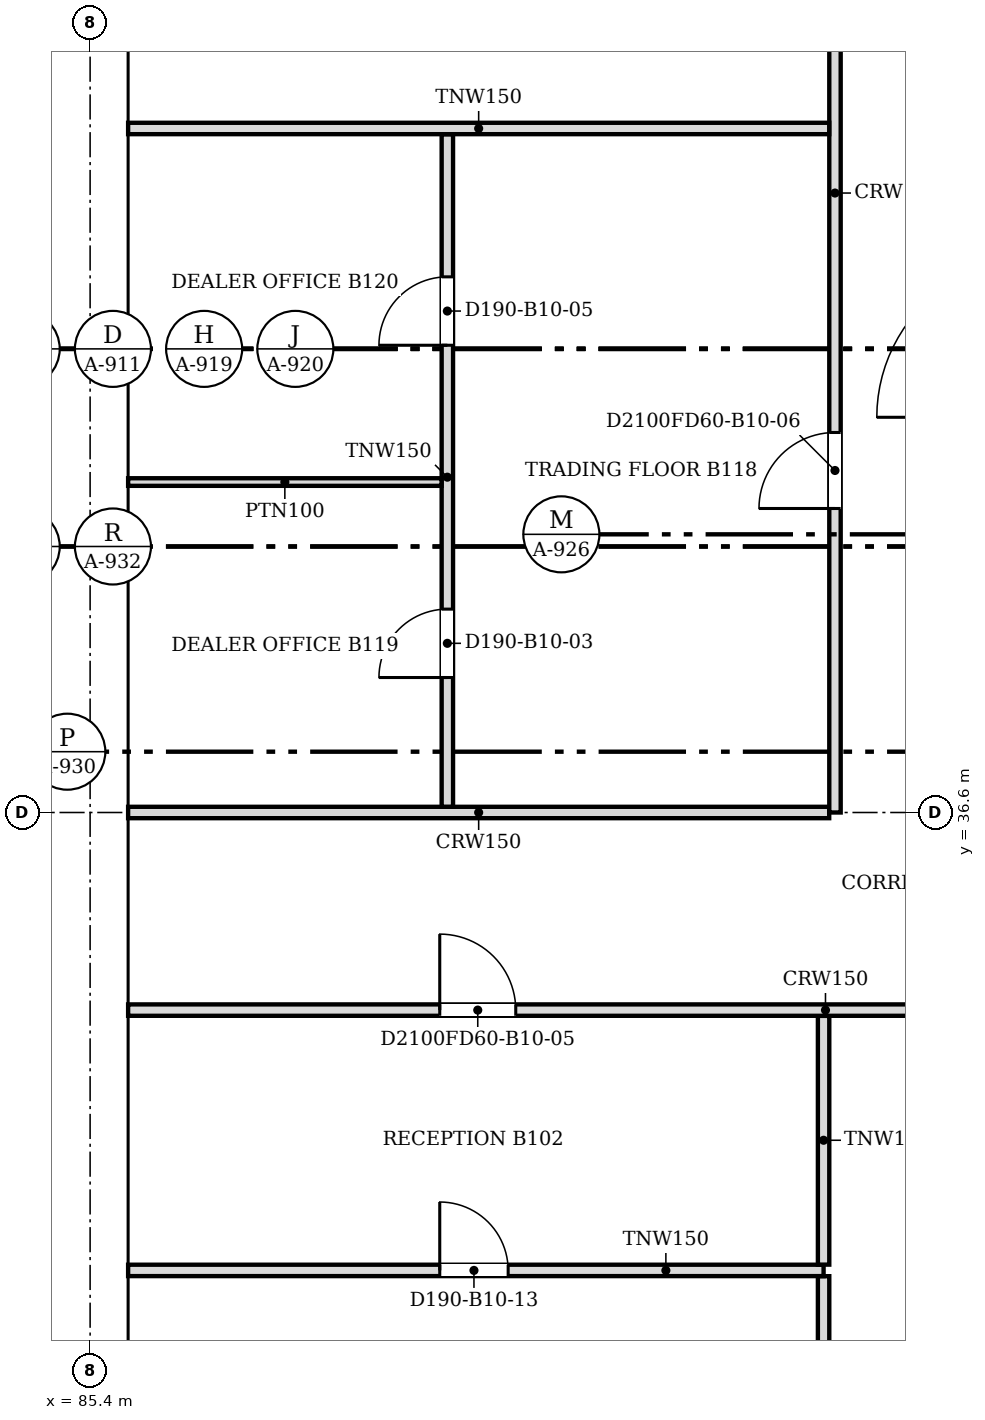
"""IFC4 building model, lengths in metres.
Left out: names, types, materials, properties, quantities, classifications, styles, units other than length and angle.
Written with IfcOpenShell. Run it as: python <this file> out.ifc"""

import sys

from ifc_helpers import new_model, si_unit, direction, frame, frame_2d, origin, place, context, subcontext, project, spatial, polyline, rectangle, outline, extrude, faceted_brep, source, transform, mapped, element, fill, save


model = new_model("IFC4")
c1 = context("Model", 3, precision=1e-05, world=origin(), true_north=direction((0.0, 1.0)))
c2 = subcontext(c1, "Body", "Model", "MODEL_VIEW")
j1 = project(units=[si_unit("LENGTHUNIT", "METRE"), si_unit("PLANEANGLEUNIT", "RADIAN")], contexts=[c1])
p1 = place(None, origin())
s1 = spatial("IfcSite", under=j1, at=p1, CompositionType="ELEMENT")
p2 = place(p1, origin())
s2 = spatial("IfcBuilding", under=s1, at=p2, CompositionType="ELEMENT")
p3 = place(p2, frame((0.0, 0.0, 99.0)))
s3 = spatial("IfcBuildingStorey", under=s2, at=p3, CompositionType="ELEMENT", Elevation=99.0)
m1 = source(origin(), c2, "Body", "Brep", [
    faceted_brep([(0.047, -0.25, 0.0), (3.05, -0.25, 3.8), (0.047, -0.25, 7.6), (0.0, -0.25, 7.54), (0.0, -0.25, 0.06), (0.093, 0.25, 7.541), (3.05, 0.25, 3.8), (0.093, 0.25, 0.059), (0.047, 0.0, 0.0), (0.047, 0.0, 7.6)], [[[0, 1, 2, 3, 4]], [[5, 6, 7]], [[7, 6, 1, 0, 8]], [[6, 5, 9, 2, 1]], [[3, 2, 9]], [[8, 0, 4]], [[7, 8, 4, 3, 9, 5]]]),
])
p4 = place(p3, frame((85.65, 48.8, -3.8), z_axis=(0.0, 0.0, 1.0), x_axis=(0.0, -1.0, 0.0)))
e1 = element("IfcWall", 1, at=p4, inside=s3, PredefinedType="SOLIDWALL", context=c2, shape_type="MappedRepresentation", body=[
    mapped(m1, transform((0.0, 0.0, 0.0), scale=1.0)),
])
m2 = source(origin(), c2, "Body", "SweptSolid", [
    extrude(outline(polyline([(0.247, 0.656), (2.731, 3.8), (0.247, 6.944), (0.247, 0.656)])), frame((0.0, 0.26, 0.0), z_axis=(0.0, -1.0, 0.0), x_axis=(1.0, 0.0, 0.0)), (0.0, 0.0, 1.0), 0.52),
])
p5 = place(p4, origin())
e2 = element("IfcOpeningElement", 2, at=p5, cuts=e1, PredefinedType="OPENING", context=c2, shape_type="MappedRepresentation", body=[
    mapped(m2, transform((0.0, 0.0, 0.0), scale=1.0)),
])
m3 = source(origin(), c2, "Body", "SweptSolid", [
    extrude(outline(polyline([(3.05, 0.0), (6.1, 3.8), (3.05, 7.6), (0.0, 3.8), (3.05, 0.0)])), frame((0.0, 0.25, 0.0), z_axis=(0.0, -1.0, 0.0), x_axis=(1.0, 0.0, 0.0)), (0.0, 0.0, 1.0), 0.5),
])
p6 = place(p3, frame((85.65, 45.75, -3.8), z_axis=(0.0, 0.0, 1.0), x_axis=(0.0, -1.0, 0.0)))
e3 = element("IfcWall", 3, at=p6, inside=s3, PredefinedType="SOLIDWALL", context=c2, shape_type="MappedRepresentation", body=[
    mapped(m3, transform((0.0, 0.0, 0.0), scale=1.0)),
])
m4 = source(origin(), c2, "Body", "SweptSolid", [
    extrude(outline(polyline([(3.05, 0.399), (5.78, 3.8), (3.05, 7.201), (0.321, 3.8), (3.05, 0.399)])), frame((0.0, 0.26, 0.0), z_axis=(0.0, -1.0, 0.0), x_axis=(1.0, 0.0, 0.0)), (0.0, 0.0, 1.0), 0.52),
])
p7 = place(p6, origin())
e4 = element("IfcOpeningElement", 4, at=p7, cuts=e3, PredefinedType="OPENING", context=c2, shape_type="MappedRepresentation", body=[
    mapped(m4, transform((0.0, 0.0, 0.0), scale=1.0)),
])
m5 = source(origin(), c2, "Body", "Brep", [
    faceted_brep([(3.05, -0.25, 0.0), (6.1, -0.25, 3.8), (6.1, -0.25, 3.8), (3.05, -0.25, 7.6), (0.0, -0.25, 3.8), (0.0, 0.25, 3.8), (3.05, 0.25, 7.6), (6.1, 0.25, 3.8), (6.1, 0.25, 3.8), (3.05, 0.25, 0.0)], [[[0, 1, 2, 3, 4]], [[5, 6, 7, 8, 9]], [[9, 8, 1, 0]], [[7, 6, 3, 2]], [[6, 5, 4, 3]], [[5, 9, 0, 4]], [[1, 8, 7, 2]]]),
])
p8 = place(p3, frame((85.65, 39.65, -3.8), z_axis=(0.0, 0.0, 1.0), x_axis=(0.0, -1.0, 0.0)))
e5 = element("IfcWall", 5, at=p8, inside=s3, PredefinedType="SOLIDWALL", context=c2, shape_type="MappedRepresentation", body=[
    mapped(m5, transform((0.0, 0.0, 0.0), scale=1.0)),
])
p9 = place(p8, origin())
e6 = element("IfcOpeningElement", 6, at=p9, cuts=e5, PredefinedType="OPENING", context=c2, shape_type="MappedRepresentation", body=[
    mapped(m4, transform((0.0, 0.0, 0.0), scale=1.0)),
])
p10 = place(p3, frame((85.65, 33.55, -3.8), z_axis=(0.0, 0.0, 1.0), x_axis=(0.0, -1.0, 0.0)))
e7 = element("IfcWall", 7, at=p10, inside=s3, PredefinedType="SOLIDWALL", context=c2, shape_type="MappedRepresentation", body=[
    mapped(m3, transform((0.0, 0.0, 0.0), scale=1.0)),
])
p11 = place(p10, origin())
e8 = element("IfcOpeningElement", 8, at=p11, cuts=e7, PredefinedType="OPENING", context=c2, shape_type="MappedRepresentation", body=[
    mapped(m4, transform((0.0, 0.0, 0.0), scale=1.0)),
])
p12 = place(p2, frame((0.0, 0.0, 102.8)))
s4 = spatial("IfcBuildingStorey", under=s2, at=p12, CompositionType="ELEMENT", Elevation=102.8)
m6 = source(origin(), c2, "Body", "Brep", [
    faceted_brep([(3.003, -0.25, 0.0), (6.053, -0.25, 3.8), (3.003, -0.25, 7.6), (0.0, -0.25, 3.8), (0.047, 0.25, 3.859), (3.003, 0.25, 7.6), (6.053, 0.25, 3.8), (3.003, 0.25, 0.0), (0.047, 0.25, 3.741), (0.0, 0.0, 3.8)], [[[0, 1, 2, 3]], [[4, 5, 6, 7, 8]], [[7, 6, 1, 0]], [[6, 5, 2, 1]], [[5, 4, 9, 3, 2]], [[8, 7, 0, 3, 9]], [[8, 9, 4]]]),
])
p13 = place(p12, frame((85.65, 48.753, -3.8), z_axis=(0.0, 0.0, 1.0), x_axis=(0.0, -1.0, 0.0)))
e9 = element("IfcWall", 9, at=p13, inside=s4, PredefinedType="SOLIDWALL", context=c2, shape_type="MappedRepresentation", body=[
    mapped(m6, transform((0.0, 0.0, 0.0), scale=1.0)),
])
m7 = source(origin(), c2, "Body", "SweptSolid", [
    extrude(outline(polyline([(3.005, 0.401), (5.733, 3.8), (3.005, 7.199), (0.319, 3.8), (3.005, 0.401)])), frame((0.0, 0.26, 0.0), z_axis=(0.0, -1.0, 0.0), x_axis=(1.0, 0.0, 0.0)), (0.0, 0.0, 1.0), 0.52),
])
p14 = place(p13, origin())
e10 = element("IfcOpeningElement", 10, at=p14, cuts=e9, PredefinedType="OPENING", context=c2, shape_type="MappedRepresentation", body=[
    mapped(m7, transform((0.0, 0.0, 0.0), scale=1.0)),
])
p15 = place(p12, frame((85.65, 42.7, -3.8), z_axis=(0.0, 0.0, 1.0), x_axis=(0.0, -1.0, 0.0)))
e11 = element("IfcWall", 11, at=p15, inside=s4, PredefinedType="SOLIDWALL", context=c2, shape_type="MappedRepresentation", body=[
    mapped(m5, transform((0.0, 0.0, 0.0), scale=1.0)),
])
p16 = place(p15, origin())
e12 = element("IfcOpeningElement", 12, at=p16, cuts=e11, PredefinedType="OPENING", context=c2, shape_type="MappedRepresentation", body=[
    mapped(m4, transform((0.0, 0.0, 0.0), scale=1.0)),
])
p17 = place(p12, frame((85.65, 36.6, -3.8), z_axis=(0.0, 0.0, 1.0), x_axis=(0.0, -1.0, 0.0)))
e13 = element("IfcWall", 13, at=p17, inside=s4, PredefinedType="SOLIDWALL", context=c2, shape_type="MappedRepresentation", body=[
    mapped(m3, transform((0.0, 0.0, 0.0), scale=1.0)),
])
p18 = place(p17, origin())
e14 = element("IfcOpeningElement", 14, at=p18, cuts=e13, PredefinedType="OPENING", context=c2, shape_type="MappedRepresentation", body=[
    mapped(m4, transform((0.0, 0.0, 0.0), scale=1.0)),
])
m8 = source(origin(), c2, "Body", "Brep", [
    faceted_brep([(3.05, -0.25, 0.0), (6.053, -0.25, 3.8), (3.05, -0.25, 7.6), (0.0, -0.25, 3.8), (0.0, 0.25, 3.8), (3.05, 0.25, 7.6), (6.007, 0.25, 3.859), (6.007, 0.25, 3.741), (3.05, 0.25, 0.0), (6.053, 0.0, 3.8)], [[[0, 1, 2, 3]], [[4, 5, 6, 7, 8]], [[8, 7, 9, 1, 0]], [[6, 5, 2, 1, 9]], [[5, 4, 3, 2]], [[4, 8, 0, 3]], [[9, 7, 6]]]),
])
p19 = place(p12, frame((85.65, 30.5, -3.8), z_axis=(0.0, 0.0, 1.0), x_axis=(0.0, -1.0, 0.0)))
e15 = element("IfcWall", 15, at=p19, inside=s4, PredefinedType="SOLIDWALL", context=c2, shape_type="MappedRepresentation", body=[
    mapped(m8, transform((0.0, 0.0, 0.0), scale=1.0)),
])
m9 = source(origin(), c2, "Body", "SweptSolid", [
    extrude(outline(polyline([(3.049, 0.401), (5.735, 3.8), (3.049, 7.199), (0.321, 3.8), (3.049, 0.401)])), frame((0.0, 0.26, 0.0), z_axis=(0.0, -1.0, 0.0), x_axis=(1.0, 0.0, 0.0)), (0.0, 0.0, 1.0), 0.52),
])
p20 = place(p19, origin())
e16 = element("IfcOpeningElement", 16, at=p20, cuts=e15, PredefinedType="OPENING", context=c2, shape_type="MappedRepresentation", body=[
    mapped(m9, transform((0.0, 0.0, 0.0), scale=1.0)),
])
p21 = place(p3, frame((95.05, 18.8, 0.0), z_axis=(0.0, 0.0, 1.0), x_axis=(0.0, 1.0, 0.0)))
e17 = element("IfcWall", 17, at=p21, inside=s3, PredefinedType="PARTITIONING", context=c2, shape_type="SweptSolid", body=[
    extrude(rectangle(XDim=11.699, YDim=0.15, at=frame_2d((5.85, 0.0))), origin(), (0.0, 0.0, 1.0), 3.067),
])
p22 = place(p3, frame((95.05, 30.575, 0.0), z_axis=(0.0, 0.0, 1.0), x_axis=(-1.0, 0.0, 0.0)))
e18 = element("IfcWall", 18, at=p22, inside=s3, PredefinedType="PARTITIONING", context=c2, shape_type="SweptSolid", body=[
    extrude(rectangle(XDim=9.15, YDim=0.15, at=frame_2d((4.575, 0.0))), origin(), (0.0, 0.0, 1.0), 3.067),
])
m10 = source(origin(), c2, "Body", "SweptSolid", [
    extrude(rectangle(XDim=0.9, YDim=2.1, at=frame_2d((0.45, 1.05))), frame((0.0, 0.085, 0.0), z_axis=(0.0, -1.0, 0.0), x_axis=(1.0, 0.0, 0.0)), (0.0, 0.0, 1.0), 0.17),
])
p23 = place(p22, frame((4.15, 0.0, 0.0)))
e19 = element("IfcOpeningElement", 19, at=p23, cuts=e18, PredefinedType="OPENING", context=c2, shape_type="MappedRepresentation", body=[
    mapped(m10, transform((0.0, 0.0, 0.0), scale=1.0)),
])
p24 = place(p3, frame((95.05, 30.651, 0.0), z_axis=(0.0, 0.0, 1.0), x_axis=(0.0, 1.0, 0.0)))
e20 = element("IfcWall", 20, at=p24, inside=s3, PredefinedType="PARTITIONING", context=c2, shape_type="SweptSolid", body=[
    extrude(rectangle(XDim=3.273, YDim=0.15, at=frame_2d((1.637, 0.0))), origin(), (0.0, 0.0, 1.0), 3.067),
])
p25 = place(p3, frame((121.5, 34.0, 0.0), z_axis=(0.0, 0.0, 1.0), x_axis=(-1.0, 0.0, 0.0)))
e21 = element("IfcWall", 21, at=p25, inside=s3, PredefinedType="PARTITIONING", context=c2, shape_type="SweptSolid", body=[
    extrude(rectangle(XDim=35.6, YDim=0.15, at=frame_2d((17.8, 0.0))), origin(), (0.0, 0.0, 1.0), 3.067),
])
m11 = source(origin(), c2, "Body", "SweptSolid", [
    extrude(rectangle(XDim=1.0, YDim=2.1, at=frame_2d((0.5, 1.05))), frame((0.0, 0.085, 0.0), z_axis=(0.0, -1.0, 0.0), x_axis=(1.0, 0.0, 0.0)), (0.0, 0.0, 1.0), 0.17),
])
p26 = place(p25, frame((2.099, 0.0, 0.0)))
e22 = element("IfcOpeningElement", 22, at=p26, cuts=e21, PredefinedType="OPENING", context=c2, shape_type="MappedRepresentation", body=[
    mapped(m11, transform((0.0, 0.0, 0.0), scale=1.0)),
])
p27 = place(p25, frame((13.999, 0.0, 0.0)))
e23 = element("IfcOpeningElement", 23, at=p27, cuts=e21, PredefinedType="OPENING", context=c2, shape_type="MappedRepresentation", body=[
    mapped(m11, transform((0.0, 0.0, 0.0), scale=1.0)),
])
p28 = place(p25, frame((7.9, 0.0, 0.0)))
e24 = element("IfcOpeningElement", 24, at=p28, cuts=e21, PredefinedType="OPENING", context=c2, shape_type="MappedRepresentation", body=[
    mapped(m11, transform((0.0, 0.0, 0.0), scale=1.0)),
])
p29 = place(p25, frame((30.5, 0.0, 0.0)))
e25 = element("IfcOpeningElement", 25, at=p29, cuts=e21, PredefinedType="OPENING", context=c2, shape_type="MappedRepresentation", body=[
    mapped(m11, transform((0.0, 0.0, 0.0), scale=1.0)),
])
p30 = place(p25, frame((21.45, 0.0, 0.0)))
e26 = element("IfcOpeningElement", 26, at=p30, cuts=e21, PredefinedType="OPENING", context=c2, shape_type="MappedRepresentation", body=[
    mapped(m10, transform((0.0, 0.0, 0.0), scale=1.0)),
])
p31 = place(p3, frame((85.9, 36.6, 0.0), z_axis=(0.0, 0.0, 1.0), x_axis=(1.0, 0.0, 0.0)))
e27 = element("IfcWall", 27, at=p31, inside=s3, PredefinedType="PARTITIONING", context=c2, shape_type="SweptSolid", body=[
    extrude(rectangle(XDim=9.224, YDim=0.15, at=frame_2d((4.612, 0.0))), origin(), (0.0, 0.0, 1.0), 3.067),
])
p32 = place(p3, frame((95.2, 36.6, 0.0), z_axis=(0.0, 0.0, 1.0), x_axis=(0.0, 1.0, 0.0)))
e28 = element("IfcWall", 28, at=p32, inside=s3, PredefinedType="PARTITIONING", context=c2, shape_type="SweptSolid", body=[
    extrude(rectangle(XDim=14.6, YDim=0.15, at=frame_2d((7.3, 0.0))), origin(), (0.0, 0.0, 1.0), 3.067),
])
p33 = place(p32, frame((11.301, 0.0, 0.0)))
e29 = element("IfcOpeningElement", 29, at=p33, cuts=e28, PredefinedType="OPENING", context=c2, shape_type="MappedRepresentation", body=[
    mapped(m11, transform((0.0, 0.0, 0.0), scale=1.0)),
])
p34 = place(p32, frame((4.0, 0.0, 0.0)))
e30 = element("IfcOpeningElement", 30, at=p34, cuts=e28, PredefinedType="OPENING", context=c2, shape_type="MappedRepresentation", body=[
    mapped(m11, transform((0.0, 0.0, 0.0), scale=1.0)),
])
p35 = place(p3, frame((90.1, 36.676, 0.0), z_axis=(0.0, 0.0, 1.0), x_axis=(0.0, 1.0, 0.0)))
e31 = element("IfcWall", 31, at=p35, inside=s3, PredefinedType="PARTITIONING", context=c2, shape_type="SweptSolid", body=[
    extrude(rectangle(XDim=8.848, YDim=0.15, at=frame_2d((4.424, 0.0))), origin(), (0.0, 0.0, 1.0), 3.067),
])
p36 = place(p35, frame((1.7, 0.0, 0.0)))
e32 = element("IfcOpeningElement", 32, at=p36, cuts=e31, PredefinedType="OPENING", context=c2, shape_type="MappedRepresentation", body=[
    mapped(m10, transform((0.0, 0.0, 0.0), scale=1.0)),
])
p37 = place(p35, frame((6.072, 0.0, 0.0)))
e33 = element("IfcOpeningElement", 33, at=p37, cuts=e31, PredefinedType="OPENING", context=c2, shape_type="MappedRepresentation", body=[
    mapped(m10, transform((0.0, 0.0, 0.0), scale=1.0)),
])
p38 = place(p3, frame((85.9, 40.948, 0.0), z_axis=(0.0, 0.0, 1.0), x_axis=(1.0, 0.0, 0.0)))
e34 = element("IfcWall", 34, at=p38, inside=s3, PredefinedType="PARTITIONING", context=c2, shape_type="SweptSolid", body=[
    extrude(rectangle(XDim=4.124, YDim=0.1, at=frame_2d((2.062, 0.0))), origin(), (0.0, 0.0, 1.0), 3.067),
])
p39 = place(p3, frame((85.9, 45.6, 0.0), z_axis=(0.0, 0.0, 1.0), x_axis=(1.0, 0.0, 0.0)))
e35 = element("IfcWall", 35, at=p39, inside=s3, PredefinedType="PARTITIONING", context=c2, shape_type="SweptSolid", body=[
    extrude(rectangle(XDim=9.224, YDim=0.15, at=frame_2d((4.612, 0.0))), origin(), (0.0, 0.0, 1.0), 3.067),
])
m12 = source(origin(), c2, "Body", "SweptSolid", [
    extrude(rectangle(XDim=0.9, YDim=2.1, at=frame_2d((0.45, 1.05))), frame((0.0, 0.025, 0.0), z_axis=(0.0, -1.0, 0.0), x_axis=(1.0, 0.0, 0.0)), (0.0, 0.0, 1.0), 0.05),
])
p40 = place(p36, origin())
e36 = element("IfcDoor", 36, at=p40, inside=s3, OperationType="SINGLE_SWING_LEFT", PredefinedType="DOOR", context=c2, shape_type="MappedRepresentation", body=[
    mapped(m12, transform((0.0, 0.0, 0.0), scale=1.0)),
])
fill(e32, e36)
p41 = place(p37, origin())
e37 = element("IfcDoor", 37, at=p41, inside=s3, OperationType="SINGLE_SWING_LEFT", PredefinedType="DOOR", context=c2, shape_type="MappedRepresentation", body=[
    mapped(m12, transform((0.0, 0.0, 0.0), scale=1.0)),
])
fill(e33, e37)
m13 = source(origin(), c2, "Body", "SweptSolid", [
    extrude(rectangle(XDim=1.0, YDim=2.1, at=frame_2d((0.5, 1.05))), frame((0.0, 0.025, 0.0), z_axis=(0.0, -1.0, 0.0), x_axis=(1.0, 0.0, 0.0)), (0.0, 0.0, 1.0), 0.05),
])
p42 = place(p29, origin())
e38 = element("IfcDoor", 38, at=p42, inside=s3, OperationType="SINGLE_SWING_RIGHT", PredefinedType="DOOR", context=c2, shape_type="MappedRepresentation", body=[
    mapped(m13, transform((0.0, 0.0, 0.0), scale=1.0)),
])
fill(e25, e38)
p43 = place(p23, origin())
e39 = element("IfcDoor", 39, at=p43, inside=s3, OperationType="SINGLE_SWING_RIGHT", PredefinedType="DOOR", context=c2, shape_type="MappedRepresentation", body=[
    mapped(m12, transform((0.0, 0.0, 0.0), scale=1.0)),
])
fill(e19, e39)
p44 = place(p34, origin())
e40 = element("IfcDoor", 40, at=p44, inside=s3, OperationType="SINGLE_SWING_LEFT", PredefinedType="DOOR", context=c2, shape_type="MappedRepresentation", body=[
    mapped(m13, transform((0.0, 0.0, 0.0), scale=1.0)),
])
fill(e30, e40)
save(model, sys.argv[1])
